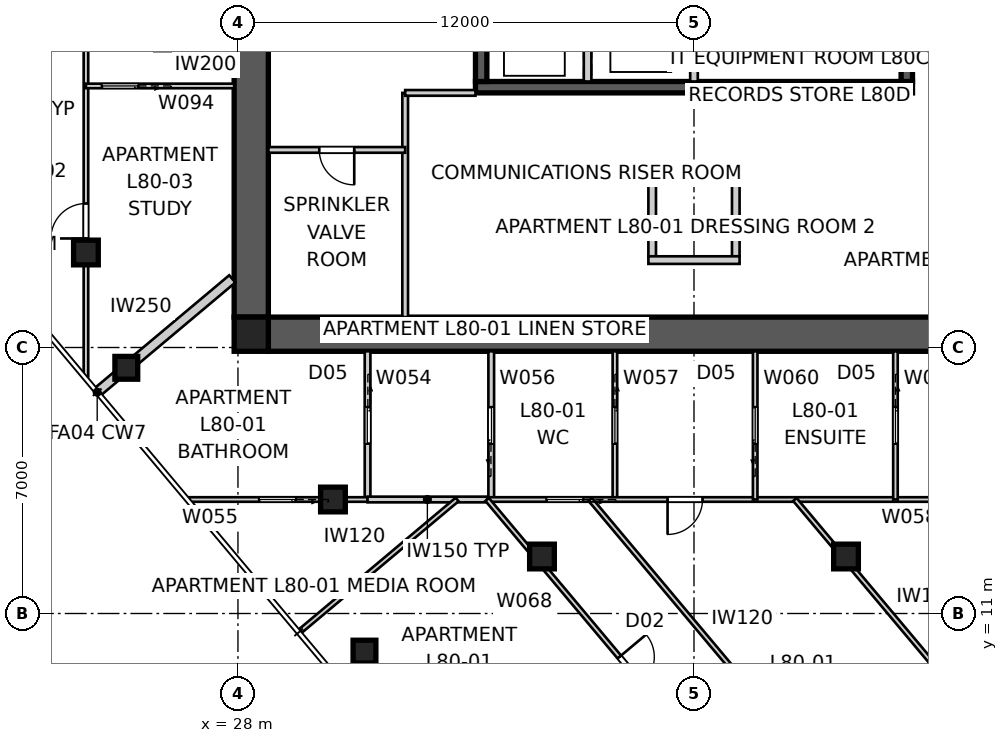
"""IFC4 building model, lengths in metres.
Left out: names, types, materials, properties, quantities, classifications, styles, units other than length and angle.
Written with IfcOpenShell. Run it as: python <this file> out.ifc"""

import sys

from ifc_helpers import new_model, si_unit, direction, frame, frame_2d, origin, origin_2d, place, context, subcontext, project, spatial, polyline, rectangle, outline, extrude, element, fill, save


model = new_model("IFC4")
c1 = context("Model", 3, precision=1e-05, world=origin(), true_north=direction((0.0, 1.0)))
c2 = subcontext(c1, "Body", "Model", "MODEL_VIEW")
j1 = project(units=[si_unit("LENGTHUNIT", "METRE"), si_unit("PLANEANGLEUNIT", "RADIAN")], contexts=[c1])
p1 = place(None, origin())
s1 = spatial("IfcSite", under=j1, at=p1, CompositionType="ELEMENT")
p2 = place(p1, origin())
s2 = spatial("IfcBuilding", under=s1, at=p2, CompositionType="ELEMENT")
p3 = place(p2, frame((0.0, 0.0, 289.6)))
s3 = spatial("IfcBuildingStorey", under=s2, at=p3, CompositionType="ELEMENT", Elevation=289.6)
p4 = place(p3, frame((51.2, 18.35, 0.0), z_axis=(0.0, 0.0, 1.0), x_axis=(-1.0, 0.0, 0.0)))
e1 = element("IfcWall", 1, at=p4, inside=s3, PredefinedType="SHEAR", context=c2, shape_type="SweptSolid", body=[
    extrude(outline(polyline([(0.0, -0.45), (22.4, -0.45), (22.4, -0.025), (22.85, -0.025), (22.85, 0.025), (22.4, 0.025), (22.4, 0.45), (0.0, 0.45), (0.0, 0.025), (-0.45, 0.025), (-0.45, -0.025), (0.0, -0.025), (0.0, -0.45)])), origin(), (0.0, 0.0, 1.0), 3.4),
])
p5 = place(p3, frame((28.35, 41.2, 0.0), z_axis=(0.0, 0.0, 1.0), x_axis=(0.0, -1.0, 0.0)))
e2 = element("IfcWall", 2, at=p5, inside=s3, PredefinedType="SHEAR", context=c2, shape_type="SweptSolid", body=[
    extrude(outline(polyline([(0.0, -0.45), (22.4, -0.45), (22.4, -0.025), (22.85, -0.025), (22.85, 0.025), (22.4, 0.025), (22.4, 0.45), (0.0, 0.45), (0.0, 0.025), (-0.45, 0.025), (-0.45, -0.025), (0.0, -0.025), (0.0, -0.45)])), origin(), (0.0, 0.0, 1.0), 3.4),
])
p6 = place(p5, frame((11.14, 0.0, 0.0)))
e3 = element("IfcOpeningElement", 3, at=p6, cuts=e2, PredefinedType="OPENING", context=c2, shape_type="SweptSolid", body=[
    extrude(rectangle(XDim=1.02, YDim=2.4, at=frame_2d((0.51, 1.2))), frame((0.0, 0.46, 0.0), z_axis=(0.0, -1.0, 0.0), x_axis=(1.0, 0.0, 0.0)), (0.0, 0.0, 1.0), 0.92),
])
p7 = place(p3, frame((45.75, 24.85, 0.0), z_axis=(0.0, 0.0, 1.0), x_axis=(-1.0, 0.0, 0.0)))
e4 = element("IfcWall", 4, at=p7, inside=s3, PredefinedType="SHEAR", context=c2, shape_type="SweptSolid", body=[
    extrude(rectangle(XDim=11.5, YDim=0.3, at=frame_2d((5.75, 0.0))), origin(), (0.0, 0.0, 1.0), 3.4),
])
p8 = place(p3, frame((45.6, 27.8, 0.0), z_axis=(0.0, 0.0, 1.0), x_axis=(0.0, -1.0, 0.0)))
e5 = element("IfcWall", 5, at=p8, inside=s3, PredefinedType="SHEAR", context=c2, shape_type="SweptSolid", body=[
    extrude(rectangle(XDim=2.8, YDim=0.3, at=frame_2d((1.4, 0.0))), origin(), (0.0, 0.0, 1.0), 3.4),
])
for number, where, z_axis, x_axis in (
    (6, (40.0, 27.8, 0.0), (0.0, 0.0, 1.0), (0.0, -1.0, 0.0)),
    (7, (37.2, 27.8, 0.0), (0.0, 0.0, 1.0), (0.0, -1.0, 0.0)),
):
    element("IfcWall", number, at=place(p3, frame(where, z_axis=z_axis, x_axis=x_axis)), inside=s3, PredefinedType="SOLIDWALL", context=c2, shape_type="SweptSolid", body=[
        extrude(rectangle(XDim=2.8, YDim=0.2, at=frame_2d((1.4, 0.0))), origin(), (0.0, 0.0, 1.0), 3.4),
    ])
p9 = place(p3, frame((34.4, 27.8, 0.0), z_axis=(0.0, 0.0, 1.0), x_axis=(0.0, -1.0, 0.0)))
e8 = element("IfcWall", 8, at=p9, inside=s3, PredefinedType="SHEAR", context=c2, shape_type="SweptSolid", body=[
    extrude(rectangle(XDim=2.8, YDim=0.3, at=frame_2d((1.4, 0.0))), origin(), (0.0, 0.0, 1.0), 3.4),
])
for number, where, z_axis, x_axis in (
    (9, (38.9, 22.4, 0.0), (0.0, 0.0, 1.0), (0.0, -1.0, 0.0)),
    (10, (41.1, 22.4, 0.0), (0.0, 0.0, 1.0), (0.0, -1.0, 0.0)),
):
    element("IfcWall", number, at=place(p3, frame(where, z_axis=z_axis, x_axis=x_axis)), inside=s3, PredefinedType="SOLIDWALL", context=c2, shape_type="SweptSolid", body=[
        extrude(rectangle(XDim=2.0, YDim=0.2, at=frame_2d((1.0, 0.0))), origin(), (0.0, 0.0, 1.0), 3.4),
    ])
for number, where, z_axis, x_axis in (
    (11, (38.8, 22.5, 0.0), (0.0, 0.0, 1.0), (1.0, 0.0, 0.0)),
    (12, (38.8, 20.3, 0.0), (0.0, 0.0, 1.0), (1.0, 0.0, 0.0)),
):
    element("IfcWall", number, at=place(p3, frame(where, z_axis=z_axis, x_axis=x_axis)), inside=s3, PredefinedType="SOLIDWALL", context=c2, shape_type="SweptSolid", body=[
        extrude(rectangle(XDim=2.4, YDim=0.2, at=frame_2d((1.2, 0.0))), origin(), (0.0, 0.0, 1.0), 3.4),
    ])
p10 = place(p3, frame((28.35, 18.35, 0.0), z_axis=(0.0, 0.0, 1.0), x_axis=(1.0, 0.0, 0.0)))
e13 = element("IfcColumn", 13, at=p10, inside=s3, PredefinedType="COLUMN", context=c2, shape_type="SweptSolid", body=[
    extrude(rectangle(XDim=0.9, YDim=0.9, at=origin_2d()), origin(), (0.0, 0.0, 1.0), 3.4),
])
for number, where, z_axis, x_axis in (
    (14, (25.062, 17.466, 0.0), (0.0, 0.0, 1.0), (1.0, 0.0, 0.0)),
    (15, (31.329, 9.997, 0.0), (0.0, 0.0, 1.0), (1.0, 0.0, 0.0)),
):
    element("IfcColumn", number, at=place(p3, frame(where, z_axis=z_axis, x_axis=x_axis)), inside=s3, PredefinedType="COLUMN", context=c2, shape_type="SweptSolid", body=[
        extrude(rectangle(XDim=0.6, YDim=0.6, at=origin_2d()), origin(), (0.0, 0.0, 1.0), 3.4),
    ])
for number, where, z_axis, x_axis in (
    (16, (24.0, 20.5, 0.0), (0.0, 0.0, 1.0), (1.0, 0.0, 0.0)),
    (17, (30.5, 14.0, 0.0), (0.0, 0.0, 1.0), (1.0, 0.0, 0.0)),
    (18, (36.0, 12.5, 0.0), (0.0, 0.0, 1.0), (1.0, 0.0, 0.0)),
    (19, (44.0, 12.5, 0.0), (0.0, 0.0, 1.0), (1.0, 0.0, 0.0)),
):
    element("IfcColumn", number, at=place(p3, frame(where, z_axis=z_axis, x_axis=x_axis)), inside=s3, PredefinedType="COLUMN", context=c2, shape_type="SweptSolid", body=[
        extrude(rectangle(XDim=0.65, YDim=0.65, at=origin_2d()), origin(), (0.0, 0.0, 1.0), 3.4),
    ])
p11 = place(p3, frame((24.296, 16.823, 0.0), z_axis=(0.0, 0.0, 1.0), x_axis=(0.76603440109, 0.64279957712, 0.0)))
e20 = element("IfcWall", 20, at=p11, inside=s3, PredefinedType="PARTITIONING", context=c2, shape_type="SweptSolid", body=[
    extrude(rectangle(XDim=4.64, YDim=0.25, at=frame_2d((2.32, 0.0))), origin(), (0.0, 0.0, 1.0), 3.25),
])
p12 = place(p3, frame((32.4, 18.8, 0.0), z_axis=(0.0, 0.0, 1.0), x_axis=(0.0, 1.0, 0.0)))
e21 = element("IfcWall", 21, at=p12, inside=s3, PredefinedType="SOLIDWALL", context=c2, shape_type="SweptSolid", body=[
    extrude(rectangle(XDim=5.9, YDim=0.15, at=frame_2d((2.95, 0.0))), origin(), (0.0, 0.0, 1.0), 3.25),
])
p13 = place(p3, frame((32.4, 24.7, 0.0), z_axis=(0.0, 0.0, 1.0), x_axis=(1.0, 0.0, 0.0)))
e22 = element("IfcWall", 22, at=p13, inside=s3, PredefinedType="SOLIDWALL", context=c2, shape_type="SweptSolid", body=[
    extrude(rectangle(XDim=1.85, YDim=0.15, at=frame_2d((0.925, 0.0))), origin(), (0.0, 0.0, 1.0), 3.25),
])
p14 = place(p3, frame((32.4, 23.2, 0.0), z_axis=(0.0, 0.0, 1.0), x_axis=(-1.0, 0.0, 0.0)))
e23 = element("IfcWall", 23, at=p14, inside=s3, PredefinedType="SOLIDWALL", context=c2, shape_type="SweptSolid", body=[
    extrude(rectangle(XDim=3.6, YDim=0.15, at=frame_2d((1.8, 0.0))), origin(), (0.0, 0.0, 1.0), 3.25),
])
p15 = place(p14, frame((1.34, 0.0, 0.0)))
e24 = element("IfcOpeningElement", 24, at=p15, cuts=e23, PredefinedType="OPENING", context=c2, shape_type="SweptSolid", body=[
    extrude(rectangle(XDim=0.92, YDim=2.1, at=frame_2d((0.46, 1.05))), frame((0.0, 0.085, 0.0), z_axis=(0.0, -1.0, 0.0), x_axis=(1.0, 0.0, 0.0)), (0.0, 0.0, 1.0), 0.17),
])
p16 = place(p3, frame((31.41, 17.9, 0.0), z_axis=(0.0, 0.0, 1.0), x_axis=(0.0, -1.0, 0.0)))
e25 = element("IfcWall", 25, at=p16, inside=s3, PredefinedType="SOLIDWALL", context=c2, shape_type="SweptSolid", body=[
    extrude(rectangle(XDim=3.9, YDim=0.15, at=frame_2d((1.95, 0.0))), origin(), (0.0, 0.0, 1.0), 3.25),
])
p17 = place(p16, frame((1.47, 0.0, 0.0)))
e26 = element("IfcOpeningElement", 26, at=p17, cuts=e25, PredefinedType="OPENING", context=c2, shape_type="SweptSolid", body=[
    extrude(rectangle(XDim=0.96, YDim=2.1, at=frame_2d((0.48, 1.05))), frame((0.0, 0.085, 0.0), z_axis=(0.0, -1.0, 0.0), x_axis=(1.0, 0.0, 0.0)), (0.0, 0.0, 1.0), 0.17),
])
p18 = place(p3, frame((31.41, 14.0, 0.0), z_axis=(0.0, 0.0, 1.0), x_axis=(-1.0, 0.0, 0.0)))
e27 = element("IfcWall", 27, at=p18, inside=s3, PredefinedType="PARTITIONING", context=c2, shape_type="SweptSolid", body=[
    extrude(rectangle(XDim=4.693, YDim=0.12, at=frame_2d((2.347, 0.0))), origin(), (0.0, 0.0, 1.0), 2.55),
])
p19 = place(p18, frame((1.893, 0.0, 0.0)))
e28 = element("IfcOpeningElement", 28, at=p19, cuts=e27, PredefinedType="OPENING", context=c2, shape_type="SweptSolid", body=[
    extrude(rectangle(XDim=0.96, YDim=2.1, at=frame_2d((0.48, 1.05))), frame((0.0, 0.07, 0.0), z_axis=(0.0, -1.0, 0.0), x_axis=(1.0, 0.0, 0.0)), (0.0, 0.0, 1.0), 0.14),
])
p20 = place(p3, frame((34.665, 14.0, 0.0), z_axis=(0.0, 0.0, 1.0), x_axis=(0.0, 1.0, 0.0)))
e29 = element("IfcWall", 29, at=p20, inside=s3, PredefinedType="SOLIDWALL", context=c2, shape_type="SweptSolid", body=[
    extrude(rectangle(XDim=3.9, YDim=0.15, at=frame_2d((1.95, 0.0))), origin(), (0.0, 0.0, 1.0), 3.25),
])
p21 = place(p20, frame((1.47, 0.0, 0.0)))
e30 = element("IfcOpeningElement", 30, at=p21, cuts=e29, PredefinedType="OPENING", context=c2, shape_type="SweptSolid", body=[
    extrude(rectangle(XDim=0.96, YDim=2.1, at=frame_2d((0.48, 1.05))), frame((0.0, 0.085, 0.0), z_axis=(0.0, -1.0, 0.0), x_axis=(1.0, 0.0, 0.0)), (0.0, 0.0, 1.0), 0.17),
])
p22 = place(p3, frame((37.919, 17.9, 0.0), z_axis=(0.0, 0.0, 1.0), x_axis=(0.0, -1.0, 0.0)))
e31 = element("IfcWall", 31, at=p22, inside=s3, PredefinedType="PARTITIONING", context=c2, shape_type="SweptSolid", body=[
    extrude(rectangle(XDim=3.9, YDim=0.12, at=frame_2d((1.95, 0.0))), origin(), (0.0, 0.0, 1.0), 3.25),
])
p23 = place(p22, frame((1.47, 0.0, 0.0)))
e32 = element("IfcOpeningElement", 32, at=p23, cuts=e31, PredefinedType="OPENING", context=c2, shape_type="SweptSolid", body=[
    extrude(rectangle(XDim=0.96, YDim=2.1, at=frame_2d((0.48, 1.05))), frame((0.0, 0.07, 0.0), z_axis=(0.0, -1.0, 0.0), x_axis=(1.0, 0.0, 0.0)), (0.0, 0.0, 1.0), 0.14),
])
p24 = place(p3, frame((51.625, 14.0, 0.0), z_axis=(0.0, 0.0, 1.0), x_axis=(-1.0, 0.0, 0.0)))
e33 = element("IfcWall", 33, at=p24, inside=s3, PredefinedType="PARTITIONING", context=c2, shape_type="SweptSolid", body=[
    extrude(rectangle(XDim=17.067, YDim=0.12, at=frame_2d((8.533, 0.0))), origin(), (0.0, 0.0, 1.0), 2.55),
])
p25 = place(p24, frame((2.702, 0.0, 0.0)))
e34 = element("IfcOpeningElement", 34, at=p25, cuts=e33, PredefinedType="OPENING", context=c2, shape_type="SweptSolid", body=[
    extrude(rectangle(XDim=0.92, YDim=2.34, at=frame_2d((0.46, 1.17))), frame((0.0, 0.07, 0.0), z_axis=(0.0, -1.0, 0.0), x_axis=(1.0, 0.0, 0.0)), (0.0, 0.0, 1.0), 0.14),
])
p26 = place(p24, frame((11.4, 0.0, 0.0)))
e35 = element("IfcOpeningElement", 35, at=p26, cuts=e33, PredefinedType="OPENING", context=c2, shape_type="SweptSolid", body=[
    extrude(rectangle(XDim=0.92, YDim=2.34, at=frame_2d((0.46, 1.17))), frame((0.0, 0.07, 0.0), z_axis=(0.0, -1.0, 0.0), x_axis=(1.0, 0.0, 0.0)), (0.0, 0.0, 1.0), 0.14),
])
p27 = place(p24, frame((14.544, 0.0, 0.0)))
e36 = element("IfcOpeningElement", 36, at=p27, cuts=e33, PredefinedType="OPENING", context=c2, shape_type="SweptSolid", body=[
    extrude(rectangle(XDim=0.96, YDim=2.1, at=frame_2d((0.48, 1.05))), frame((0.0, 0.07, 0.0), z_axis=(0.0, -1.0, 0.0), x_axis=(1.0, 0.0, 0.0)), (0.0, 0.0, 1.0), 0.14),
])
p28 = place(p3, frame((34.558, 14.0, 0.0), z_axis=(0.0, 0.0, 1.0), x_axis=(-1.0, 0.0, 0.0)))
e37 = element("IfcWall", 37, at=p28, inside=s3, PredefinedType="SOLIDWALL", context=c2, shape_type="SweptSolid", body=[
    extrude(rectangle(XDim=3.147, YDim=0.15, at=frame_2d((1.574, 0.0))), origin(), (0.0, 0.0, 1.0), 3.25),
])
p29 = place(p3, frame((41.61, 14.0, 0.0), z_axis=(0.0, 0.0, 1.0), x_axis=(0.0, 1.0, 0.0)))
e38 = element("IfcWall", 38, at=p29, inside=s3, PredefinedType="PARTITIONING", context=c2, shape_type="SweptSolid", body=[
    extrude(rectangle(XDim=3.9, YDim=0.12, at=frame_2d((1.95, 0.0))), origin(), (0.0, 0.0, 1.0), 3.25),
])
p30 = place(p29, frame((1.47, 0.0, 0.0)))
e39 = element("IfcOpeningElement", 39, at=p30, cuts=e38, PredefinedType="OPENING", context=c2, shape_type="SweptSolid", body=[
    extrude(rectangle(XDim=0.96, YDim=2.1, at=frame_2d((0.48, 1.05))), frame((0.0, 0.07, 0.0), z_axis=(0.0, -1.0, 0.0), x_axis=(1.0, 0.0, 0.0)), (0.0, 0.0, 1.0), 0.14),
])
p31 = place(p3, frame((45.301, 17.9, 0.0), z_axis=(0.0, 0.0, 1.0), x_axis=(0.0, -1.0, 0.0)))
e40 = element("IfcWall", 40, at=p31, inside=s3, PredefinedType="PARTITIONING", context=c2, shape_type="SweptSolid", body=[
    extrude(rectangle(XDim=3.9, YDim=0.12, at=frame_2d((1.95, 0.0))), origin(), (0.0, 0.0, 1.0), 3.25),
])
p32 = place(p31, frame((1.47, 0.0, 0.0)))
e41 = element("IfcOpeningElement", 41, at=p32, cuts=e40, PredefinedType="OPENING", context=c2, shape_type="SweptSolid", body=[
    extrude(rectangle(XDim=0.96, YDim=2.1, at=frame_2d((0.48, 1.05))), frame((0.0, 0.07, 0.0), z_axis=(0.0, -1.0, 0.0), x_axis=(1.0, 0.0, 0.0)), (0.0, 0.0, 1.0), 0.14),
])
p33 = place(p3, frame((34.558, 14.0, 0.0), z_axis=(0.0, 0.0, 1.0), x_axis=(0.642782931909, -0.766048368216, 0.0)))
e42 = element("IfcWall", 42, at=p33, inside=s3, PredefinedType="PARTITIONING", context=c2, shape_type="SweptSolid", body=[
    extrude(rectangle(XDim=11.701, YDim=0.12, at=frame_2d((5.851, 0.0))), origin(), (0.0, 0.0, 1.0), 3.25),
])
p34 = place(p33, frame((5.411, 0.0, 0.0)))
e43 = element("IfcOpeningElement", 43, at=p34, cuts=e42, PredefinedType="OPENING", context=c2, shape_type="SweptSolid", body=[
    extrude(rectangle(XDim=0.92, YDim=2.34, at=frame_2d((0.46, 1.17))), frame((0.0, 0.07, 0.0), z_axis=(0.0, -1.0, 0.0), x_axis=(1.0, 0.0, 0.0)), (0.0, 0.0, 1.0), 0.14),
])
p35 = place(p3, frame((29.63, 10.529, 0.0), z_axis=(0.0, 0.0, 1.0), x_axis=(0.766034275706, 0.642799726543, 0.0)))
e44 = element("IfcWall", 44, at=p35, inside=s3, PredefinedType="PARTITIONING", context=c2, shape_type="SweptSolid", body=[
    extrude(rectangle(XDim=5.4, YDim=0.12, at=frame_2d((2.7, 0.0))), origin(), (0.0, 0.0, 1.0), 3.25),
])
p36 = place(p3, frame((42.656, 14.0, 0.0), z_axis=(0.0, 0.0, 1.0), x_axis=(0.642779498388, -0.766051249233, 0.0)))
e45 = element("IfcWall", 45, at=p36, inside=s3, PredefinedType="PARTITIONING", context=c2, shape_type="SweptSolid", body=[
    extrude(rectangle(XDim=6.496, YDim=0.12, at=frame_2d((3.248, 0.0))), origin(), (0.0, 0.0, 1.0), 3.25),
])
p37 = place(p3, frame((43.672, 6.372, 0.0), z_axis=(0.0, 0.0, 1.0), x_axis=(-0.64278775678, 0.766044319693, 0.0)))
e46 = element("IfcWall", 46, at=p37, inside=s3, PredefinedType="PARTITIONING", context=c2, shape_type="SweptSolid", body=[
    extrude(rectangle(XDim=9.957, YDim=0.12, at=frame_2d((4.979, 0.0))), origin(), (0.0, 0.0, 1.0), 3.25),
])
p38 = place(p3, frame((24.0, 17.238, 0.0), z_axis=(0.0, 0.0, 1.0), x_axis=(0.0, 1.0, 0.0)))
e47 = element("IfcWall", 47, at=p38, inside=s3, PredefinedType="PARTITIONING", context=c2, shape_type="SweptSolid", body=[
    extrude(rectangle(XDim=26.045, YDim=0.12, at=frame_2d((13.022, 0.0))), origin(), (0.0, 0.0, 1.0), 2.55),
])
p39 = place(p38, frame((13.116, 0.0, 0.0)))
e48 = element("IfcOpeningElement", 48, at=p39, cuts=e47, PredefinedType="OPENING", context=c2, shape_type="SweptSolid", body=[
    extrude(rectangle(XDim=0.92, YDim=2.34, at=frame_2d((0.46, 1.17))), frame((0.0, 0.07, 0.0), z_axis=(0.0, -1.0, 0.0), x_axis=(1.0, 0.0, 0.0)), (0.0, 0.0, 1.0), 0.14),
])
p40 = place(p38, frame((15.705, 0.0, 0.0)))
e49 = element("IfcOpeningElement", 49, at=p40, cuts=e47, PredefinedType="OPENING", context=c2, shape_type="SweptSolid", body=[
    extrude(rectangle(XDim=0.92, YDim=2.34, at=frame_2d((0.46, 1.17))), frame((0.0, 0.07, 0.0), z_axis=(0.0, -1.0, 0.0), x_axis=(1.0, 0.0, 0.0)), (0.0, 0.0, 1.0), 0.14),
])
p41 = place(p38, frame((20.191, 0.0, 0.0)))
e50 = element("IfcOpeningElement", 50, at=p41, cuts=e47, PredefinedType="OPENING", context=c2, shape_type="SweptSolid", body=[
    extrude(rectangle(XDim=0.96, YDim=2.1, at=frame_2d((0.48, 1.05))), frame((0.0, 0.07, 0.0), z_axis=(0.0, -1.0, 0.0), x_axis=(1.0, 0.0, 0.0)), (0.0, 0.0, 1.0), 0.14),
])
p42 = place(p38, frame((3.631, 0.0, 0.0)))
e51 = element("IfcOpeningElement", 51, at=p42, cuts=e47, PredefinedType="OPENING", context=c2, shape_type="SweptSolid", body=[
    extrude(rectangle(XDim=0.92, YDim=2.34, at=frame_2d((0.46, 1.17))), frame((0.0, 0.07, 0.0), z_axis=(0.0, -1.0, 0.0), x_axis=(1.0, 0.0, 0.0)), (0.0, 0.0, 1.0), 0.14),
])
p43 = place(p3, frame((27.9, 24.883, 0.0), z_axis=(0.0, 0.0, 1.0), x_axis=(-1.0, 0.0, 0.0)))
e52 = element("IfcWall", 52, at=p43, inside=s3, PredefinedType="PARTITIONING", context=c2, shape_type="SweptSolid", body=[
    extrude(rectangle(XDim=3.9, YDim=0.12, at=frame_2d((1.95, 0.0))), origin(), (0.0, 0.0, 1.0), 3.25),
])
p44 = place(p43, frame((2.52, 0.0, 0.0)))
e53 = element("IfcOpeningElement", 53, at=p44, cuts=e52, PredefinedType="OPENING", context=c2, shape_type="SweptSolid", body=[
    extrude(rectangle(XDim=0.96, YDim=2.1, at=frame_2d((0.48, 1.05))), frame((0.0, 0.07, 0.0), z_axis=(0.0, -1.0, 0.0), x_axis=(1.0, 0.0, 0.0)), (0.0, 0.0, 1.0), 0.14),
])
p45 = place(p3, frame((24.0, 27.344, 0.0), z_axis=(0.0, 0.0, 1.0), x_axis=(-0.766051249233, -0.642779498388, 0.0)))
e54 = element("IfcWall", 54, at=p45, inside=s3, PredefinedType="PARTITIONING", context=c2, shape_type="SweptSolid", body=[
    extrude(rectangle(XDim=6.496, YDim=0.12, at=frame_2d((3.248, 0.0))), origin(), (0.0, 0.0, 1.0), 3.25),
])
p46 = place(p15, origin())
e55 = element("IfcDoor", 55, at=p46, inside=s3, OperationType="SINGLE_SWING_LEFT", PredefinedType="DOOR", context=c2, shape_type="SweptSolid", body=[
    extrude(rectangle(XDim=0.92, YDim=2.1, at=frame_2d((0.46, 1.05))), frame((0.0, 0.025, 0.0), z_axis=(0.0, -1.0, 0.0), x_axis=(1.0, 0.0, 0.0)), (0.0, 0.0, 1.0), 0.05),
])
fill(e24, e55)
p47 = place(p44, origin())
e56 = element("IfcDoor", 56, at=p47, inside=s3, OperationType="SLIDING_TO_LEFT", PredefinedType="DOOR", context=c2, shape_type="SweptSolid", body=[
    extrude(rectangle(XDim=0.96, YDim=2.1, at=frame_2d((0.48, 1.05))), frame((0.0, 0.025, 0.0), z_axis=(0.0, -1.0, 0.0), x_axis=(1.0, 0.0, 0.0)), (0.0, 0.0, 1.0), 0.05),
])
fill(e53, e56)
p48 = place(p42, origin())
e57 = element("IfcDoor", 57, at=p48, inside=s3, OperationType="SINGLE_SWING_LEFT", PredefinedType="DOOR", context=c2, shape_type="SweptSolid", body=[
    extrude(rectangle(XDim=0.92, YDim=2.34, at=frame_2d((0.46, 1.17))), frame((0.0, 0.025, 0.0), z_axis=(0.0, -1.0, 0.0), x_axis=(1.0, 0.0, 0.0)), (0.0, 0.0, 1.0), 0.05),
])
fill(e51, e57)
p49 = place(p32, origin())
e58 = element("IfcDoor", 58, at=p49, inside=s3, OperationType="SLIDING_TO_LEFT", PredefinedType="DOOR", context=c2, shape_type="SweptSolid", body=[
    extrude(rectangle(XDim=0.96, YDim=2.1, at=frame_2d((0.48, 1.05))), frame((0.0, 0.025, 0.0), z_axis=(0.0, -1.0, 0.0), x_axis=(1.0, 0.0, 0.0)), (0.0, 0.0, 1.0), 0.05),
])
fill(e41, e58)
p50 = place(p30, origin())
e59 = element("IfcDoor", 59, at=p50, inside=s3, OperationType="SLIDING_TO_LEFT", PredefinedType="DOOR", context=c2, shape_type="SweptSolid", body=[
    extrude(rectangle(XDim=0.96, YDim=2.1, at=frame_2d((0.48, 1.05))), frame((0.0, 0.025, 0.0), z_axis=(0.0, -1.0, 0.0), x_axis=(1.0, 0.0, 0.0)), (0.0, 0.0, 1.0), 0.05),
])
fill(e39, e59)
p51 = place(p23, origin())
e60 = element("IfcDoor", 60, at=p51, inside=s3, OperationType="SLIDING_TO_LEFT", PredefinedType="DOOR", context=c2, shape_type="SweptSolid", body=[
    extrude(rectangle(XDim=0.96, YDim=2.1, at=frame_2d((0.48, 1.05))), frame((0.0, 0.025, 0.0), z_axis=(0.0, -1.0, 0.0), x_axis=(1.0, 0.0, 0.0)), (0.0, 0.0, 1.0), 0.05),
])
fill(e32, e60)
p52 = place(p26, origin())
e61 = element("IfcDoor", 61, at=p52, inside=s3, OperationType="SINGLE_SWING_RIGHT", PredefinedType="DOOR", context=c2, shape_type="SweptSolid", body=[
    extrude(rectangle(XDim=0.92, YDim=2.34, at=frame_2d((0.46, 1.17))), frame((0.0, 0.025, 0.0), z_axis=(0.0, -1.0, 0.0), x_axis=(1.0, 0.0, 0.0)), (0.0, 0.0, 1.0), 0.05),
])
fill(e35, e61)
p53 = place(p21, origin())
e62 = element("IfcDoor", 62, at=p53, inside=s3, OperationType="SLIDING_TO_LEFT", PredefinedType="DOOR", context=c2, shape_type="SweptSolid", body=[
    extrude(rectangle(XDim=0.96, YDim=2.1, at=frame_2d((0.48, 1.05))), frame((0.0, 0.025, 0.0), z_axis=(0.0, -1.0, 0.0), x_axis=(1.0, 0.0, 0.0)), (0.0, 0.0, 1.0), 0.05),
])
fill(e30, e62)
p54 = place(p27, origin())
e63 = element("IfcDoor", 63, at=p54, inside=s3, OperationType="SLIDING_TO_LEFT", PredefinedType="DOOR", context=c2, shape_type="SweptSolid", body=[
    extrude(rectangle(XDim=0.96, YDim=2.1, at=frame_2d((0.48, 1.05))), frame((0.0, 0.025, 0.0), z_axis=(0.0, -1.0, 0.0), x_axis=(1.0, 0.0, 0.0)), (0.0, 0.0, 1.0), 0.05),
])
fill(e36, e63)
p55 = place(p17, origin())
e64 = element("IfcDoor", 64, at=p55, inside=s3, OperationType="SLIDING_TO_LEFT", PredefinedType="DOOR", context=c2, shape_type="SweptSolid", body=[
    extrude(rectangle(XDim=0.96, YDim=2.1, at=frame_2d((0.48, 1.05))), frame((0.0, 0.025, 0.0), z_axis=(0.0, -1.0, 0.0), x_axis=(1.0, 0.0, 0.0)), (0.0, 0.0, 1.0), 0.05),
])
fill(e26, e64)
p56 = place(p34, origin())
e65 = element("IfcDoor", 65, at=p56, inside=s3, OperationType="SINGLE_SWING_LEFT", PredefinedType="DOOR", context=c2, shape_type="SweptSolid", body=[
    extrude(rectangle(XDim=0.92, YDim=2.34, at=frame_2d((0.46, 1.17))), frame((0.0, 0.025, 0.0), z_axis=(0.0, -1.0, 0.0), x_axis=(1.0, 0.0, 0.0)), (0.0, 0.0, 1.0), 0.05),
])
fill(e43, e65)
p57 = place(p19, origin())
e66 = element("IfcDoor", 66, at=p57, inside=s3, OperationType="SLIDING_TO_LEFT", PredefinedType="DOOR", context=c2, shape_type="SweptSolid", body=[
    extrude(rectangle(XDim=0.96, YDim=2.1, at=frame_2d((0.48, 1.05))), frame((0.0, 0.025, 0.0), z_axis=(0.0, -1.0, 0.0), x_axis=(1.0, 0.0, 0.0)), (0.0, 0.0, 1.0), 0.05),
])
fill(e28, e66)
save(model, sys.argv[1])
